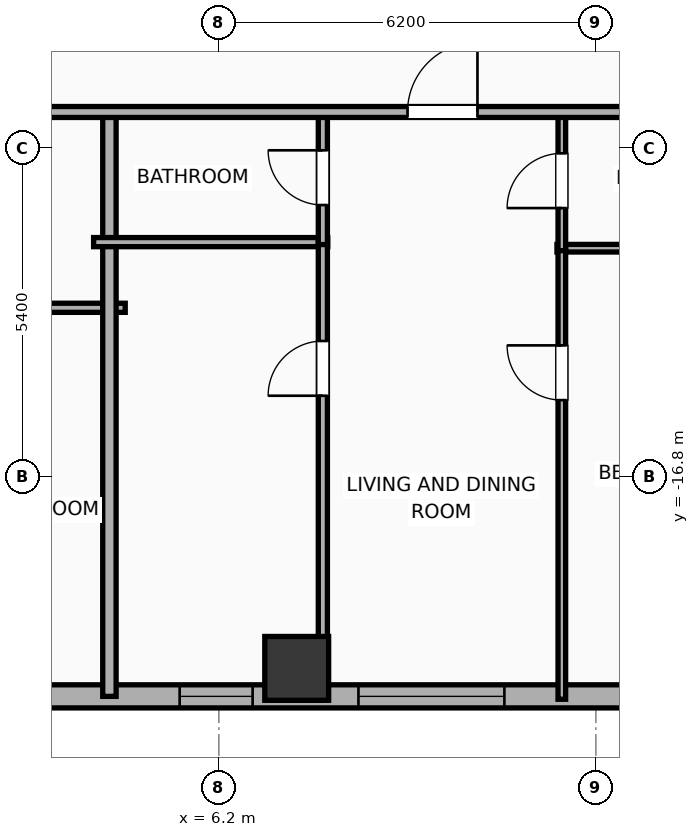
"""IFC4 building model, lengths in metres.
Left out: names, types, materials, properties, quantities, classifications, styles, units other than length and angle.
Written with IfcOpenShell. Run it as: python <this file> out.ifc"""

import sys

from ifc_helpers import new_model, si_unit, direction, frame, frame_2d, origin, origin_2d, place, context, subcontext, project, spatial, rectangle, hollow_rectangle, extrude, element, fill, save


model = new_model("IFC4")
c1 = context("Model", 3, precision=1e-05, world=origin(), true_north=direction((0.0, 1.0)))
c2 = subcontext(c1, "Body", "Model", "MODEL_VIEW")
j1 = project(units=[si_unit("LENGTHUNIT", "METRE"), si_unit("PLANEANGLEUNIT", "RADIAN")], contexts=[c1])
p1 = place(None, origin())
s1 = spatial("IfcSite", under=j1, at=p1, CompositionType="ELEMENT")
p2 = place(p1, origin())
s2 = spatial("IfcBuilding", under=s1, at=p2, CompositionType="ELEMENT")
p3 = place(p2, frame((0.0, 0.0, 132.6)))
s3 = spatial("IfcBuildingStorey", under=s2, at=p3, CompositionType="ELEMENT", Elevation=132.6)
p4 = place(p3, frame((7.48, -19.95, 0.0), z_axis=(0.0, 0.0, 1.0), x_axis=(1.0, 0.0, 0.0)))
e1 = element("IfcColumn", 1, at=p4, inside=s3, PredefinedType="COLUMN", context=c2, shape_type="SweptSolid", body=[
    extrude(hollow_rectangle(XDim=1.05, YDim=1.05, WallThickness=0.036, at=origin_2d()), origin(), (0.0, 0.0, 1.0), 3.9),
])
p5 = place(p3, frame((29.381, -20.41, 0.0), z_axis=(0.0, 0.0, 1.0), x_axis=(-1.0, 0.0, 0.0)))
e2 = element("IfcWall", 2, at=p5, inside=s3, PredefinedType="ELEMENTEDWALL", context=c2, shape_type="SweptSolid", body=[
    extrude(rectangle(XDim=54.763, YDim=0.38, at=frame_2d((27.381, 0.0))), origin(), (0.0, 0.0, 1.0), 3.65),
])
p6 = place(p5, frame((3.995, 0.0, 0.75)))
e3 = element("IfcOpeningElement", 3, at=p6, cuts=e2, PredefinedType="OPENING", context=c2, shape_type="SweptSolid", body=[
    extrude(rectangle(XDim=2.4, YDim=2.1, at=frame_2d((1.2, 1.05))), frame((0.0, 0.2, 0.0), z_axis=(0.0, -1.0, 0.0), x_axis=(1.0, 0.0, 0.0)), (0.0, 0.0, 1.0), 0.4),
])
p7 = place(p5, frame((18.486, 0.0, 0.75)))
e4 = element("IfcOpeningElement", 4, at=p7, cuts=e2, PredefinedType="OPENING", context=c2, shape_type="SweptSolid", body=[
    extrude(rectangle(XDim=2.4, YDim=2.1, at=frame_2d((1.2, 1.05))), frame((0.0, 0.2, 0.0), z_axis=(0.0, -1.0, 0.0), x_axis=(1.0, 0.0, 0.0)), (0.0, 0.0, 1.0), 0.4),
])
p8 = place(p5, frame((46.717, 0.0, 0.75)))
e5 = element("IfcOpeningElement", 5, at=p8, cuts=e2, PredefinedType="OPENING", context=c2, shape_type="SweptSolid", body=[
    extrude(rectangle(XDim=2.4, YDim=2.1, at=frame_2d((1.2, 1.05))), frame((0.0, 0.2, 0.0), z_axis=(0.0, -1.0, 0.0), x_axis=(1.0, 0.0, 0.0)), (0.0, 0.0, 1.0), 0.4),
])
p9 = place(p5, frame((52.651, 0.0, 0.75)))
e6 = element("IfcOpeningElement", 6, at=p9, cuts=e2, PredefinedType="OPENING", context=c2, shape_type="SweptSolid", body=[
    extrude(rectangle(XDim=1.2, YDim=2.05, at=frame_2d((0.6, 1.025))), frame((0.0, 0.2, 0.0), z_axis=(0.0, -1.0, 0.0), x_axis=(1.0, 0.0, 0.0)), (0.0, 0.0, 1.0), 0.4),
])
p10 = place(p5, frame((50.521, 0.0, 0.75)))
e7 = element("IfcOpeningElement", 7, at=p10, cuts=e2, PredefinedType="OPENING", context=c2, shape_type="SweptSolid", body=[
    extrude(rectangle(XDim=1.2, YDim=2.05, at=frame_2d((0.6, 1.025))), frame((0.0, 0.2, 0.0), z_axis=(0.0, -1.0, 0.0), x_axis=(1.0, 0.0, 0.0)), (0.0, 0.0, 1.0), 0.4),
])
p11 = place(p5, frame((40.191, 0.0, 0.75)))
e8 = element("IfcOpeningElement", 8, at=p11, cuts=e2, PredefinedType="OPENING", context=c2, shape_type="SweptSolid", body=[
    extrude(rectangle(XDim=1.2, YDim=2.05, at=frame_2d((0.6, 1.025))), frame((0.0, 0.2, 0.0), z_axis=(0.0, -1.0, 0.0), x_axis=(1.0, 0.0, 0.0)), (0.0, 0.0, 1.0), 0.4),
])
p12 = place(p5, frame((44.631, 0.0, 0.75)))
e9 = element("IfcOpeningElement", 9, at=p12, cuts=e2, PredefinedType="OPENING", context=c2, shape_type="SweptSolid", body=[
    extrude(rectangle(XDim=1.2, YDim=2.05, at=frame_2d((0.6, 1.025))), frame((0.0, 0.2, 0.0), z_axis=(0.0, -1.0, 0.0), x_axis=(1.0, 0.0, 0.0)), (0.0, 0.0, 1.0), 0.4),
])
p13 = place(p5, frame((36.561, 0.0, 0.75)))
e10 = element("IfcOpeningElement", 10, at=p13, cuts=e2, PredefinedType="OPENING", context=c2, shape_type="SweptSolid", body=[
    extrude(rectangle(XDim=1.2, YDim=2.05, at=frame_2d((0.6, 1.025))), frame((0.0, 0.2, 0.0), z_axis=(0.0, -1.0, 0.0), x_axis=(1.0, 0.0, 0.0)), (0.0, 0.0, 1.0), 0.4),
])
p14 = place(p5, frame((30.004, 0.0, 0.75)))
e11 = element("IfcOpeningElement", 11, at=p14, cuts=e2, PredefinedType="OPENING", context=c2, shape_type="SweptSolid", body=[
    extrude(rectangle(XDim=1.2, YDim=2.05, at=frame_2d((0.6, 1.025))), frame((0.0, 0.2, 0.0), z_axis=(0.0, -1.0, 0.0), x_axis=(1.0, 0.0, 0.0)), (0.0, 0.0, 1.0), 0.4),
])
p15 = place(p5, frame((33.599, 0.0, 0.75)))
e12 = element("IfcOpeningElement", 12, at=p15, cuts=e2, PredefinedType="OPENING", context=c2, shape_type="SweptSolid", body=[
    extrude(rectangle(XDim=1.2, YDim=2.05, at=frame_2d((0.6, 1.025))), frame((0.0, 0.2, 0.0), z_axis=(0.0, -1.0, 0.0), x_axis=(1.0, 0.0, 0.0)), (0.0, 0.0, 1.0), 0.4),
])
p16 = place(p5, frame((26.086, 0.0, 0.75)))
e13 = element("IfcOpeningElement", 13, at=p16, cuts=e2, PredefinedType="OPENING", context=c2, shape_type="SweptSolid", body=[
    extrude(rectangle(XDim=1.2, YDim=2.05, at=frame_2d((0.6, 1.025))), frame((0.0, 0.2, 0.0), z_axis=(0.0, -1.0, 0.0), x_axis=(1.0, 0.0, 0.0)), (0.0, 0.0, 1.0), 0.4),
])
p17 = place(p5, frame((22.626, 0.0, 0.75)))
e14 = element("IfcOpeningElement", 14, at=p17, cuts=e2, PredefinedType="OPENING", context=c2, shape_type="SweptSolid", body=[
    extrude(rectangle(XDim=1.2, YDim=2.05, at=frame_2d((0.6, 1.025))), frame((0.0, 0.2, 0.0), z_axis=(0.0, -1.0, 0.0), x_axis=(1.0, 0.0, 0.0)), (0.0, 0.0, 1.0), 0.4),
])
p18 = place(p5, frame((15.361, 0.0, 0.75)))
e15 = element("IfcOpeningElement", 15, at=p18, cuts=e2, PredefinedType="OPENING", context=c2, shape_type="SweptSolid", body=[
    extrude(rectangle(XDim=1.2, YDim=2.05, at=frame_2d((0.6, 1.025))), frame((0.0, 0.2, 0.0), z_axis=(0.0, -1.0, 0.0), x_axis=(1.0, 0.0, 0.0)), (0.0, 0.0, 1.0), 0.4),
])
p19 = place(p5, frame((8.986, 0.0, 0.75)))
e16 = element("IfcOpeningElement", 16, at=p19, cuts=e2, PredefinedType="OPENING", context=c2, shape_type="SweptSolid", body=[
    extrude(rectangle(XDim=1.2, YDim=2.05, at=frame_2d((0.6, 1.025))), frame((0.0, 0.2, 0.0), z_axis=(0.0, -1.0, 0.0), x_axis=(1.0, 0.0, 0.0)), (0.0, 0.0, 1.0), 0.4),
])
p20 = place(p5, frame((1.736, 0.0, 0.75)))
e17 = element("IfcOpeningElement", 17, at=p20, cuts=e2, PredefinedType="OPENING", context=c2, shape_type="SweptSolid", body=[
    extrude(rectangle(XDim=1.2, YDim=2.05, at=frame_2d((0.6, 1.025))), frame((0.0, 0.2, 0.0), z_axis=(0.0, -1.0, 0.0), x_axis=(1.0, 0.0, 0.0)), (0.0, 0.0, 1.0), 0.4),
])
p21 = place(p3, frame((0.87, -14.02, 0.0), z_axis=(0.0, 0.0, 1.0), x_axis=(1.0, 0.0, 0.0)))
e18 = element("IfcWall", 18, at=p21, inside=s3, PredefinedType="PLUMBINGWALL", context=c2, shape_type="SweptSolid", body=[
    extrude(rectangle(XDim=3.79, YDim=0.15, at=frame_2d((1.895, 0.0))), origin(), (0.0, 0.0, 1.0), 3.65),
])
p22 = place(p3, frame((4.4, -20.41, 0.0), z_axis=(0.0, 0.0, 1.0), x_axis=(0.0, 1.0, 0.0)))
e19 = element("IfcWall", 19, at=p22, inside=s3, PredefinedType="PARTITIONING", context=c2, shape_type="SweptSolid", body=[
    extrude(rectangle(XDim=9.69, YDim=0.22, at=frame_2d((4.845, 0.0))), origin(), (0.0, 0.0, 1.0), 3.65),
])
p23 = place(p3, frame((4.14, -12.94, 0.0), z_axis=(0.0, 0.0, 1.0), x_axis=(1.0, 0.0, 0.0)))
e20 = element("IfcWall", 20, at=p23, inside=s3, PredefinedType="PLUMBINGWALL", context=c2, shape_type="SweptSolid", body=[
    extrude(rectangle(XDim=3.85, YDim=0.15, at=frame_2d((1.925, 0.0))), origin(), (0.0, 0.0, 1.0), 3.65),
])
p24 = place(p3, frame((11.76, -13.04, 0.0), z_axis=(0.0, 0.0, 1.0), x_axis=(1.0, 0.0, 0.0)))
e21 = element("IfcWall", 21, at=p24, inside=s3, PredefinedType="PARTITIONING", context=c2, shape_type="SweptSolid", body=[
    extrude(rectangle(XDim=3.5, YDim=0.125, at=frame_2d((1.75, 0.0))), origin(), (0.0, 0.0, 1.0), 3.65),
])
p25 = place(p3, frame((7.91, -20.458, 0.0), z_axis=(0.0, 0.0, 1.0), x_axis=(0.0, 1.0, 0.0)))
e22 = element("IfcWall", 22, at=p25, inside=s3, PredefinedType="PLUMBINGWALL", context=c2, shape_type="SweptSolid", body=[
    extrude(rectangle(XDim=7.558, YDim=0.15, at=frame_2d((3.779, 0.0))), origin(), (0.0, 0.0, 1.0), 3.65),
])
p26 = place(p25, frame((4.991, 0.0, 0.0)))
e23 = element("IfcOpeningElement", 23, at=p26, cuts=e22, PredefinedType="OPENING", context=c2, shape_type="SweptSolid", body=[
    extrude(rectangle(XDim=0.9, YDim=2.05, at=frame_2d((0.45, 1.025))), frame((0.0, 0.085, 0.0), z_axis=(0.0, -1.0, 0.0), x_axis=(1.0, 0.0, 0.0)), (0.0, 0.0, 1.0), 0.17),
])
p27 = place(p3, frame((7.91, -12.98, 0.0), z_axis=(0.0, 0.0, 1.0), x_axis=(0.0, 1.0, 0.0)))
e24 = element("IfcWall", 24, at=p27, inside=s3, PredefinedType="PLUMBINGWALL", context=c2, shape_type="SweptSolid", body=[
    extrude(rectangle(XDim=2.2, YDim=0.15, at=frame_2d((1.1, 0.0))), origin(), (0.0, 0.0, 1.0), 3.65),
])
p28 = place(p27, frame((0.65, 0.0, 0.0)))
e25 = element("IfcOpeningElement", 25, at=p28, cuts=e24, PredefinedType="OPENING", context=c2, shape_type="SweptSolid", body=[
    extrude(rectangle(XDim=0.9, YDim=2.05, at=frame_2d((0.45, 1.025))), frame((0.0, 0.085, 0.0), z_axis=(0.0, -1.0, 0.0), x_axis=(1.0, 0.0, 0.0)), (0.0, 0.0, 1.0), 0.17),
])
p29 = place(p3, frame((11.84, -20.458, 0.0), z_axis=(0.0, 0.0, 1.0), x_axis=(0.0, 1.0, 0.0)))
e26 = element("IfcWall", 26, at=p29, inside=s3, PredefinedType="PARTITIONING", context=c2, shape_type="SweptSolid", body=[
    extrude(rectangle(XDim=7.458, YDim=0.125, at=frame_2d((3.729, 0.0))), origin(), (0.0, 0.0, 1.0), 3.65),
])
p30 = place(p29, frame((4.919, 0.0, 0.0)))
e27 = element("IfcOpeningElement", 27, at=p30, cuts=e26, PredefinedType="OPENING", context=c2, shape_type="SweptSolid", body=[
    extrude(rectangle(XDim=0.9, YDim=2.05, at=frame_2d((0.45, 1.025))), frame((0.0, 0.073, 0.0), z_axis=(0.0, -1.0, 0.0), x_axis=(1.0, 0.0, 0.0)), (0.0, 0.0, 1.0), 0.145),
])
p31 = place(p3, frame((11.84, -13.08, 0.0), z_axis=(0.0, 0.0, 1.0), x_axis=(0.0, 1.0, 0.0)))
e28 = element("IfcWall", 28, at=p31, inside=s3, PredefinedType="PARTITIONING", context=c2, shape_type="SweptSolid", body=[
    extrude(rectangle(XDim=2.3, YDim=0.125, at=frame_2d((1.15, 0.0))), origin(), (0.0, 0.0, 1.0), 3.65),
])
p32 = place(p31, frame((0.7, 0.0, 0.0)))
e29 = element("IfcOpeningElement", 29, at=p32, cuts=e28, PredefinedType="OPENING", context=c2, shape_type="SweptSolid", body=[
    extrude(rectangle(XDim=0.9, YDim=2.05, at=frame_2d((0.45, 1.025))), frame((0.0, 0.073, 0.0), z_axis=(0.0, -1.0, 0.0), x_axis=(1.0, 0.0, 0.0)), (0.0, 0.0, 1.0), 0.145),
])
p33 = place(p3, frame((-29.21, -10.8, 0.0), z_axis=(0.0, 0.0, 1.0), x_axis=(1.0, 0.0, 0.0)))
e30 = element("IfcWall", 30, at=p33, inside=s3, PredefinedType="PARTITIONING", context=c2, shape_type="SweptSolid", body=[
    extrude(rectangle(XDim=62.42, YDim=0.18, at=frame_2d((31.21, 0.0))), origin(), (0.0, 0.0, 1.0), 3.65),
])
p34 = place(p33, frame((2.74, 0.0, 0.0)))
e31 = element("IfcOpeningElement", 31, at=p34, cuts=e30, PredefinedType="OPENING", context=c2, shape_type="SweptSolid", body=[
    extrude(rectangle(XDim=0.9, YDim=2.05, at=frame_2d((0.45, 1.025))), frame((0.0, 0.1, 0.0), z_axis=(0.0, -1.0, 0.0), x_axis=(1.0, 0.0, 0.0)), (0.0, 0.0, 1.0), 0.2),
])
p35 = place(p33, frame((9.968, 0.0, 0.0)))
e32 = element("IfcOpeningElement", 32, at=p35, cuts=e30, PredefinedType="OPENING", context=c2, shape_type="SweptSolid", body=[
    extrude(rectangle(XDim=1.15, YDim=2.05, at=frame_2d((0.575, 1.025))), frame((0.0, 0.1, 0.0), z_axis=(0.0, -1.0, 0.0), x_axis=(1.0, 0.0, 0.0)), (0.0, 0.0, 1.0), 0.2),
])
p36 = place(p33, frame((17.227, 0.0, 0.0)))
e33 = element("IfcOpeningElement", 33, at=p36, cuts=e30, PredefinedType="OPENING", context=c2, shape_type="SweptSolid", body=[
    extrude(rectangle(XDim=1.15, YDim=2.05, at=frame_2d((0.575, 1.025))), frame((0.0, 0.1, 0.0), z_axis=(0.0, -1.0, 0.0), x_axis=(1.0, 0.0, 0.0)), (0.0, 0.0, 1.0), 0.2),
])
p37 = place(p33, frame((28.157, 0.0, 0.0)))
e34 = element("IfcOpeningElement", 34, at=p37, cuts=e30, PredefinedType="OPENING", context=c2, shape_type="SweptSolid", body=[
    extrude(rectangle(XDim=1.15, YDim=2.05, at=frame_2d((0.575, 1.025))), frame((0.0, 0.1, 0.0), z_axis=(0.0, -1.0, 0.0), x_axis=(1.0, 0.0, 0.0)), (0.0, 0.0, 1.0), 0.2),
])
p38 = place(p33, frame((38.512, 0.0, 0.0)))
e35 = element("IfcOpeningElement", 35, at=p38, cuts=e30, PredefinedType="OPENING", context=c2, shape_type="SweptSolid", body=[
    extrude(rectangle(XDim=1.15, YDim=2.05, at=frame_2d((0.575, 1.025))), frame((0.0, 0.1, 0.0), z_axis=(0.0, -1.0, 0.0), x_axis=(1.0, 0.0, 0.0)), (0.0, 0.0, 1.0), 0.2),
])
p39 = place(p33, frame((49.33, 0.0, 0.0)))
e36 = element("IfcOpeningElement", 36, at=p39, cuts=e30, PredefinedType="OPENING", context=c2, shape_type="SweptSolid", body=[
    extrude(rectangle(XDim=1.15, YDim=2.05, at=frame_2d((0.575, 1.025))), frame((0.0, 0.1, 0.0), z_axis=(0.0, -1.0, 0.0), x_axis=(1.0, 0.0, 0.0)), (0.0, 0.0, 1.0), 0.2),
])
p40 = place(p33, frame((58.237, 0.0, 0.0)))
e37 = element("IfcOpeningElement", 37, at=p40, cuts=e30, PredefinedType="OPENING", context=c2, shape_type="SweptSolid", body=[
    extrude(rectangle(XDim=1.15, YDim=2.05, at=frame_2d((0.575, 1.025))), frame((0.0, 0.1, 0.0), z_axis=(0.0, -1.0, 0.0), x_axis=(1.0, 0.0, 0.0)), (0.0, 0.0, 1.0), 0.2),
])
p41 = place(p7, origin())
e38 = element("IfcWindow", 38, at=p41, inside=s3, PartitioningType="SINGLE_PANEL", PredefinedType="WINDOW", context=c2, shape_type="SweptSolid", body=[
    extrude(rectangle(XDim=2.4, YDim=2.1, at=frame_2d((1.2, 1.05))), frame((0.0, 0.03, 0.0), z_axis=(0.0, -1.0, 0.0), x_axis=(1.0, 0.0, 0.0)), (0.0, 0.0, 1.0), 0.06),
])
fill(e4, e38)
p42 = place(p17, origin())
e39 = element("IfcWindow", 39, at=p42, inside=s3, PartitioningType="SINGLE_PANEL", PredefinedType="WINDOW", context=c2, shape_type="SweptSolid", body=[
    extrude(rectangle(XDim=1.2, YDim=2.05, at=frame_2d((0.6, 1.025))), frame((0.0, 0.03, 0.0), z_axis=(0.0, -1.0, 0.0), x_axis=(1.0, 0.0, 0.0)), (0.0, 0.0, 1.0), 0.06),
])
fill(e14, e39)
p43 = place(p26, origin())
e40 = element("IfcDoor", 40, at=p43, inside=s3, OperationType="SINGLE_SWING_LEFT", PredefinedType="DOOR", context=c2, shape_type="SweptSolid", body=[
    extrude(rectangle(XDim=0.9, YDim=2.05, at=frame_2d((0.45, 1.025))), frame((0.0, 0.025, 0.0), z_axis=(0.0, -1.0, 0.0), x_axis=(1.0, 0.0, 0.0)), (0.0, 0.0, 1.0), 0.05),
])
fill(e23, e40)
p44 = place(p28, origin())
e41 = element("IfcDoor", 41, at=p44, inside=s3, OperationType="SINGLE_SWING_RIGHT", PredefinedType="DOOR", context=c2, shape_type="SweptSolid", body=[
    extrude(rectangle(XDim=0.9, YDim=2.05, at=frame_2d((0.45, 1.025))), frame((0.0, 0.025, 0.0), z_axis=(0.0, -1.0, 0.0), x_axis=(1.0, 0.0, 0.0)), (0.0, 0.0, 1.0), 0.05),
])
fill(e25, e41)
p45 = place(p30, origin())
e42 = element("IfcDoor", 42, at=p45, inside=s3, OperationType="SINGLE_SWING_RIGHT", PredefinedType="DOOR", context=c2, shape_type="SweptSolid", body=[
    extrude(rectangle(XDim=0.9, YDim=2.05, at=frame_2d((0.45, 1.025))), frame((0.0, 0.025, 0.0), z_axis=(0.0, -1.0, 0.0), x_axis=(1.0, 0.0, 0.0)), (0.0, 0.0, 1.0), 0.05),
])
fill(e27, e42)
p46 = place(p32, origin())
e43 = element("IfcDoor", 43, at=p46, inside=s3, OperationType="SINGLE_SWING_LEFT", PredefinedType="DOOR", context=c2, shape_type="SweptSolid", body=[
    extrude(rectangle(XDim=0.9, YDim=2.05, at=frame_2d((0.45, 1.025))), frame((0.0, 0.025, 0.0), z_axis=(0.0, -1.0, 0.0), x_axis=(1.0, 0.0, 0.0)), (0.0, 0.0, 1.0), 0.05),
])
fill(e29, e43)
p47 = place(p38, origin())
e44 = element("IfcDoor", 44, at=p47, inside=s3, OperationType="SINGLE_SWING_RIGHT", PredefinedType="DOOR", context=c2, shape_type="SweptSolid", body=[
    extrude(rectangle(XDim=1.15, YDim=2.05, at=frame_2d((0.575, 1.025))), frame((0.0, 0.025, 0.0), z_axis=(0.0, -1.0, 0.0), x_axis=(1.0, 0.0, 0.0)), (0.0, 0.0, 1.0), 0.05),
])
fill(e35, e44)
save(model, sys.argv[1])
